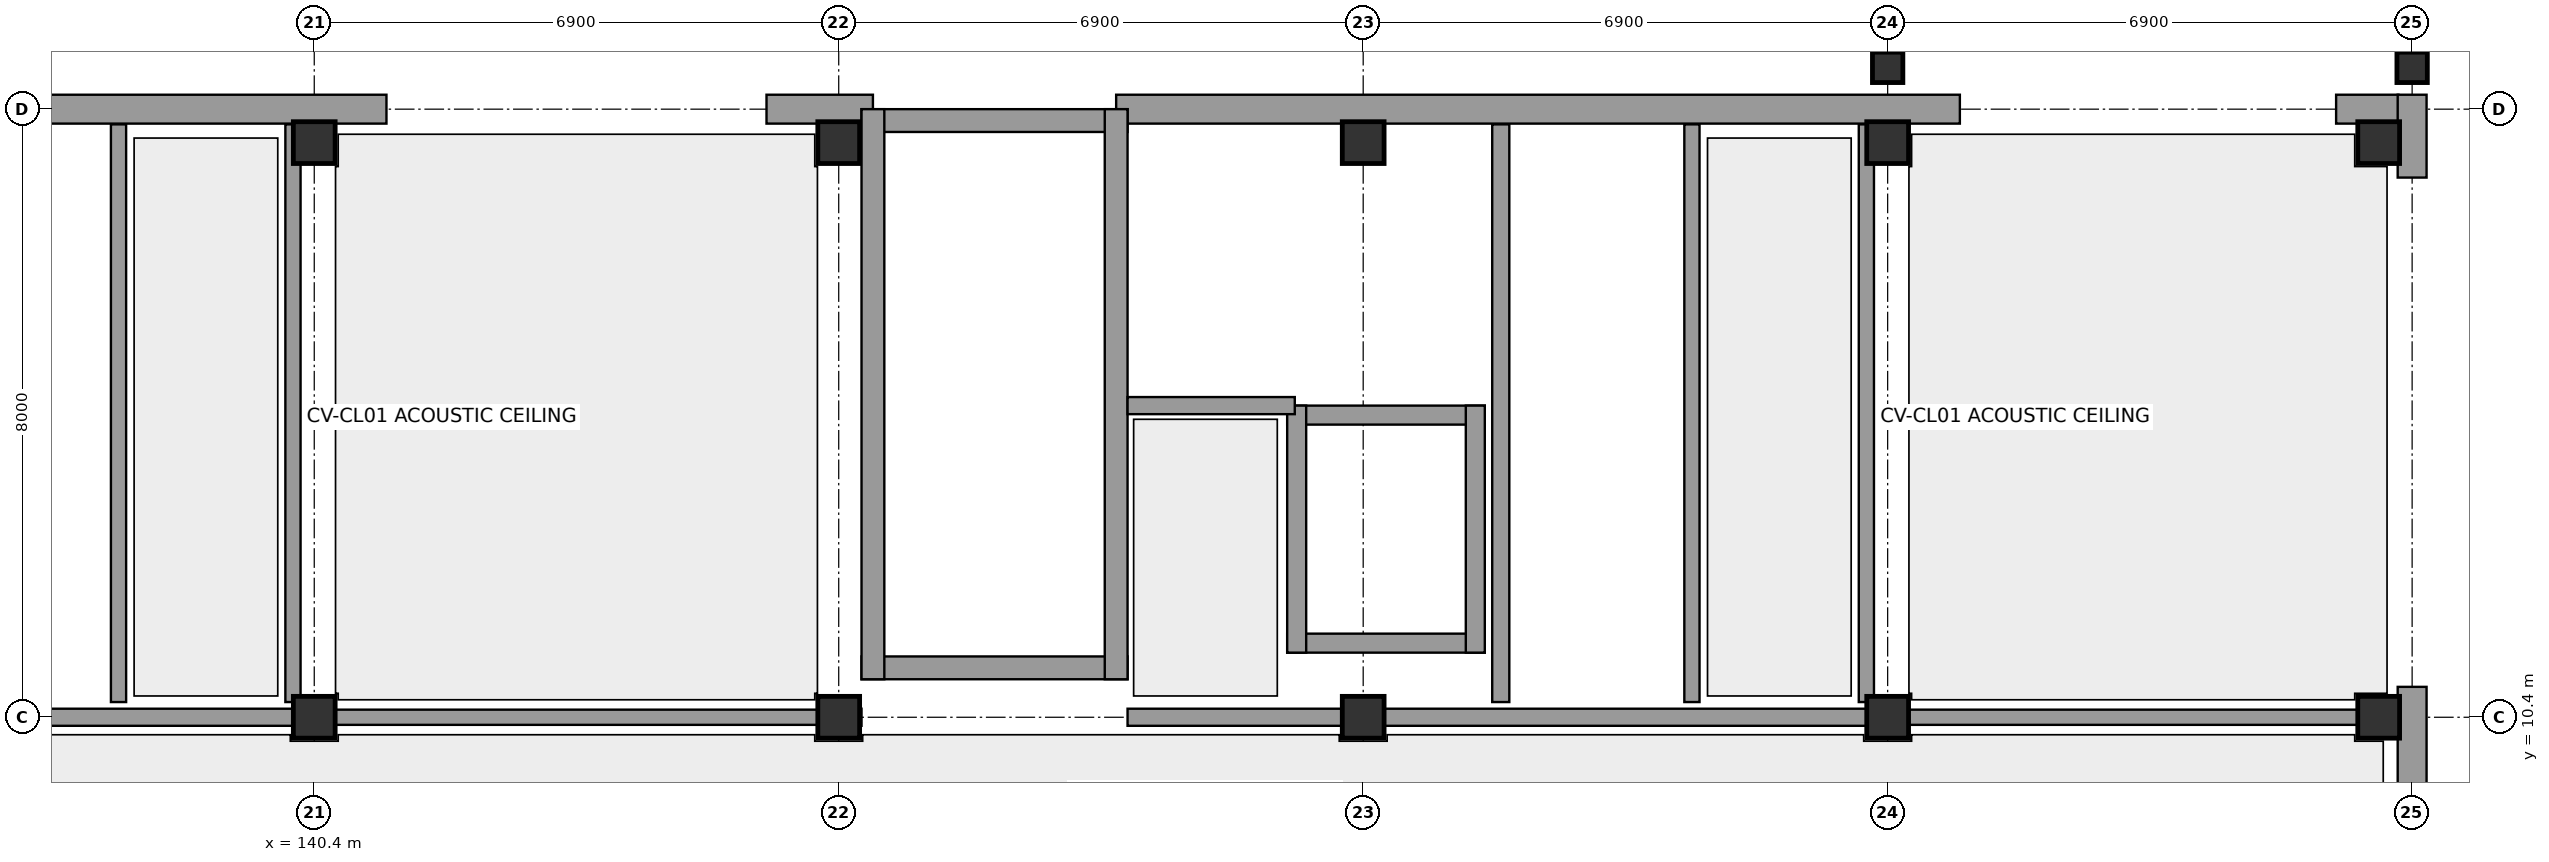
"""IFC4 building model, lengths in metres.
Left out: names, types, materials, properties, quantities, classifications, styles, units other than length and angle.
Written with IfcOpenShell. Run it as: python <this file> out.ifc"""

import sys

from ifc_helpers import new_model, si_unit, direction, frame, frame_2d, origin, origin_with_axes, origin_2d, place, context, subcontext, project, spatial, rectangle, extrude, element, fill, save


model = new_model("IFC4")
c1 = context("Model", 3, precision=1e-05, world=origin(), true_north=direction((0.0, 1.0)))
c2 = subcontext(c1, "Body", "Model", "MODEL_VIEW")
j1 = project(units=[si_unit("LENGTHUNIT", "METRE"), si_unit("PLANEANGLEUNIT", "RADIAN")], contexts=[c1])
p1 = place(None, origin())
s1 = spatial("IfcSite", under=j1, at=p1, CompositionType="ELEMENT")
p2 = place(p1, origin())
s2 = spatial("IfcBuilding", under=s1, at=p2, CompositionType="ELEMENT")
p3 = place(p2, origin())
s3 = spatial("IfcBuildingStorey", under=s2, at=p3, CompositionType="ELEMENT", Elevation=0.0)
for number, where, z_axis, x_axis in (
    (1, (140.4, 10.4, 0.0), (0.0, 0.0, 1.0), (1.0, 0.0, 0.0)),
    (2, (140.4, 17.96, 0.0), (0.0, 0.0, 1.0), (1.0, 0.0, 0.0)),
    (3, (147.3, 10.4, 0.0), (0.0, 0.0, 1.0), (1.0, 0.0, 0.0)),
    (4, (147.3, 17.96, 0.0), (0.0, 0.0, 1.0), (1.0, 0.0, 0.0)),
    (5, (154.2, 10.4, 0.0), (0.0, 0.0, 1.0), (1.0, 0.0, 0.0)),
    (6, (154.2, 17.96, 0.0), (0.0, 0.0, 1.0), (1.0, 0.0, 0.0)),
    (7, (161.1, 10.4, 0.0), (0.0, 0.0, 1.0), (1.0, 0.0, 0.0)),
    (8, (161.1, 17.96, 0.0), (0.0, 0.0, 1.0), (1.0, 0.0, 0.0)),
    (9, (167.56, 10.4, 0.0), (0.0, 0.0, 1.0), (1.0, 0.0, 0.0)),
    (10, (167.56, 17.96, 0.0), (0.0, 0.0, 1.0), (1.0, 0.0, 0.0)),
):
    element("IfcColumn", number, at=place(p3, frame(where, z_axis=z_axis, x_axis=x_axis)), inside=s3, PredefinedType="COLUMN", context=c2, shape_type="SweptSolid", body=[
        extrude(rectangle(XDim=0.55, YDim=0.55, at=origin_2d()), origin(), (0.0, 0.0, 1.0), 4.4),
    ])
for number, where, z_axis, x_axis in (
    (11, (161.1, 18.95, 0.0), (0.0, 0.0, 1.0), (1.0, 0.0, 0.0)),
    (12, (168.0, 18.95, 0.0), (0.0, 0.0, 1.0), (1.0, 0.0, 0.0)),
):
    element("IfcColumn", number, at=place(p3, frame(where, z_axis=z_axis, x_axis=x_axis)), inside=s3, PredefinedType="COLUMN", context=c2, shape_type="SweptSolid", body=[
        extrude(rectangle(XDim=0.4, YDim=0.4, at=origin_2d()), origin(), (0.0, 0.0, 1.0), 4.4),
    ])
p4 = place(p3, frame((130.25, 18.4, 0.0), z_axis=(0.0, 0.0, 1.0), x_axis=(1.0, 0.0, 0.0)))
e13 = element("IfcWall", 13, at=p4, inside=s3, PredefinedType="STANDARD", context=c2, shape_type="SweptSolid", body=[
    extrude(rectangle(XDim=11.1, YDim=0.38, at=frame_2d((5.55, 0.0))), origin(), (0.0, 0.0, 1.0), 4.12),
])
p5 = place(p3, frame((146.35, 18.4, 0.0), z_axis=(0.0, 0.0, 1.0), x_axis=(1.0, 0.0, 0.0)))
e14 = element("IfcWall", 14, at=p5, inside=s3, PredefinedType="STANDARD", context=c2, shape_type="SweptSolid", body=[
    extrude(rectangle(XDim=1.4, YDim=0.38, at=frame_2d((0.7, 0.0))), origin(), (0.0, 0.0, 1.0), 4.12),
])
p6 = place(p3, frame((150.95, 18.4, 0.0), z_axis=(0.0, 0.0, 1.0), x_axis=(1.0, 0.0, 0.0)))
e15 = element("IfcWall", 15, at=p6, inside=s3, PredefinedType="STANDARD", context=c2, shape_type="SweptSolid", body=[
    extrude(rectangle(XDim=11.1, YDim=0.38, at=frame_2d((5.55, 0.0))), origin(), (0.0, 0.0, 1.0), 4.12),
])
p7 = place(p3, frame((167.0, 18.4, 0.0), z_axis=(0.0, 0.0, 1.0), x_axis=(1.0, 0.0, 0.0)))
e16 = element("IfcWall", 16, at=p7, inside=s3, PredefinedType="STANDARD", context=c2, shape_type="SweptSolid", body=[
    extrude(rectangle(XDim=0.82, YDim=0.38, at=frame_2d((0.41, 0.0))), origin(), (0.0, 0.0, 1.0), 4.12),
])
p8 = place(p3, frame((168.0, 7.6, 0.0), z_axis=(0.0, 0.0, 1.0), x_axis=(0.0, 1.0, 0.0)))
e17 = element("IfcWall", 17, at=p8, inside=s3, PredefinedType="STANDARD", context=c2, shape_type="SweptSolid", body=[
    extrude(rectangle(XDim=3.2, YDim=0.38, at=frame_2d((1.6, 0.0))), origin(), (0.0, 0.0, 1.0), 4.12),
])
p9 = place(p3, frame((168.0, 17.5, 0.0), z_axis=(0.0, 0.0, 1.0), x_axis=(0.0, 1.0, 0.0)))
e18 = element("IfcWall", 18, at=p9, inside=s3, PredefinedType="STANDARD", context=c2, shape_type="SweptSolid", body=[
    extrude(rectangle(XDim=1.09, YDim=0.38, at=frame_2d((0.545, 0.0))), origin(), (0.0, 0.0, 1.0), 4.12),
])
p10 = place(p3, frame((168.0, 18.95, 0.0), z_axis=(0.0, 0.0, 1.0), x_axis=(0.0, 1.0, 0.0)))
e19 = element("IfcWall", 19, at=p10, inside=s3, PredefinedType="STANDARD", context=c2, shape_type="SweptSolid", body=[
    extrude(rectangle(XDim=6.85, YDim=0.31, at=frame_2d((3.425, 0.0))), origin(), (0.0, 0.0, 1.0), 3.68),
])
p11 = place(p10, frame((1.85, 0.0, 0.0)))
e20 = element("IfcOpeningElement", 20, at=p11, cuts=e19, PredefinedType="OPENING", context=c2, shape_type="SweptSolid", body=[
    extrude(rectangle(XDim=4.0, YDim=2.8, at=frame_2d((2.0, 1.4))), frame((0.0, 0.167, 0.0), z_axis=(0.0, -1.0, 0.0), x_axis=(1.0, 0.0, 0.0)), (0.0, 0.0, 1.0), 0.334),
])
for number, where, z_axis, x_axis in (
    (21, (137.825, 10.6, 0.0), (0.0, 0.0, 1.0), (0.0, 1.0, 0.0)),
    (22, (140.12, 10.6, 0.0), (0.0, 0.0, 1.0), (0.0, 1.0, 0.0)),
):
    element("IfcWall", number, at=place(p3, frame(where, z_axis=z_axis, x_axis=x_axis)), inside=s3, PredefinedType="PARTITIONING", context=c2, shape_type="SweptSolid", body=[
        extrude(rectangle(XDim=7.6, YDim=0.2, at=frame_2d((3.8, 0.0))), origin(), (0.0, 0.0, 1.0), 4.12),
    ])
p12 = place(p3, frame((130.4, 10.4, 0.0), z_axis=(0.0, 0.0, 1.0), x_axis=(1.0, 0.0, 0.0)))
e23 = element("IfcWall", 23, at=p12, inside=s3, PredefinedType="PARTITIONING", context=c2, shape_type="SweptSolid", body=[
    extrude(rectangle(XDim=10.0, YDim=0.225, at=frame_2d((5.0, 0.0))), origin(), (0.0, 0.0, 1.0), 3.56),
])
p13 = place(p12, frame((0.475, 0.0, 0.0)))
e24 = element("IfcOpeningElement", 24, at=p13, cuts=e23, PredefinedType="OPENING", context=c2, shape_type="SweptSolid", body=[
    extrude(rectangle(XDim=1.1, YDim=2.15, at=frame_2d((0.55, 1.075))), frame((0.0, 0.125, 0.0), z_axis=(0.0, -1.0, 0.0), x_axis=(1.0, 0.0, 0.0)), (0.0, 0.0, 1.0), 0.249),
])
p14 = place(p12, frame((5.85, 0.0, 0.0)))
e25 = element("IfcOpeningElement", 25, at=p14, cuts=e23, PredefinedType="OPENING", context=c2, shape_type="SweptSolid", body=[
    extrude(rectangle(XDim=0.9, YDim=2.1, at=frame_2d((0.45, 1.05))), frame((0.0, 0.125, 0.0), z_axis=(0.0, -1.0, 0.0), x_axis=(1.0, 0.0, 0.0)), (0.0, 0.0, 1.0), 0.249),
])
p15 = place(p12, frame((7.9, 0.0, 0.0)))
e26 = element("IfcOpeningElement", 26, at=p15, cuts=e23, PredefinedType="OPENING", context=c2, shape_type="SweptSolid", body=[
    extrude(rectangle(XDim=0.95, YDim=2.15, at=frame_2d((0.475, 1.075))), frame((0.0, 0.125, 0.0), z_axis=(0.0, -1.0, 0.0), x_axis=(1.0, 0.0, 0.0)), (0.0, 0.0, 1.0), 0.249),
])
p16 = place(p3, frame((147.6, 18.25, 0.0), z_axis=(0.0, 0.0, 1.0), x_axis=(1.0, 0.0, 0.0)))
e27 = element("IfcWall", 27, at=p16, inside=s3, PredefinedType="SHEAR", context=c2, shape_type="SweptSolid", body=[
    extrude(rectangle(XDim=3.5, YDim=0.3, at=frame_2d((1.75, 0.0))), origin(), (0.0, 0.0, 1.0), 4.12),
])
p17 = place(p16, frame((1.05, 0.0, 0.0)))
e28 = element("IfcOpeningElement", 28, at=p17, cuts=e27, PredefinedType="OPENING", context=c2, shape_type="SweptSolid", body=[
    extrude(rectangle(XDim=1.4, YDim=2.25, at=frame_2d((0.7, 1.125))), frame((0.0, 0.162, 0.0), z_axis=(0.0, -1.0, 0.0), x_axis=(1.0, 0.0, 0.0)), (0.0, 0.0, 1.0), 0.324),
])
p18 = place(p3, frame((147.6, 11.05, 0.0), z_axis=(0.0, 0.0, 1.0), x_axis=(1.0, 0.0, 0.0)))
e29 = element("IfcWall", 29, at=p18, inside=s3, PredefinedType="SHEAR", context=c2, shape_type="SweptSolid", body=[
    extrude(rectangle(XDim=3.5, YDim=0.3, at=frame_2d((1.75, 0.0))), origin(), (0.0, 0.0, 1.0), 4.12),
])
p19 = place(p3, frame((147.75, 10.9, 0.0), z_axis=(0.0, 0.0, 1.0), x_axis=(0.0, 1.0, 0.0)))
e30 = element("IfcWall", 30, at=p19, inside=s3, PredefinedType="SHEAR", context=c2, shape_type="SweptSolid", body=[
    extrude(rectangle(XDim=7.5, YDim=0.3, at=frame_2d((3.75, 0.0))), origin(), (0.0, 0.0, 1.0), 4.12),
])
p20 = place(p3, frame((150.95, 10.9, 0.0), z_axis=(0.0, 0.0, 1.0), x_axis=(0.0, 1.0, 0.0)))
e31 = element("IfcWall", 31, at=p20, inside=s3, PredefinedType="SHEAR", context=c2, shape_type="SweptSolid", body=[
    extrude(rectangle(XDim=7.5, YDim=0.3, at=frame_2d((3.75, 0.0))), origin(), (0.0, 0.0, 1.0), 4.12),
])
p21 = place(p20, frame((5.7, 0.0, 0.0)))
e32 = element("IfcOpeningElement", 32, at=p21, cuts=e31, PredefinedType="OPENING", context=c2, shape_type="SweptSolid", body=[
    extrude(rectangle(XDim=1.15, YDim=2.15, at=frame_2d((0.575, 1.075))), frame((0.0, 0.162, 0.0), z_axis=(0.0, -1.0, 0.0), x_axis=(1.0, 0.0, 0.0)), (0.0, 0.0, 1.0), 0.324),
])
p22 = place(p3, frame((153.2, 14.375, 0.0), z_axis=(0.0, 0.0, 1.0), x_axis=(1.0, 0.0, 0.0)))
e33 = element("IfcWall", 33, at=p22, inside=s3, PredefinedType="SHEAR", context=c2, shape_type="SweptSolid", body=[
    extrude(rectangle(XDim=2.6, YDim=0.25, at=frame_2d((1.3, 0.0))), origin(), (0.0, 0.0, 1.0), 4.12),
])
p23 = place(p22, frame((0.925, 0.0, 0.0)))
e34 = element("IfcOpeningElement", 34, at=p23, cuts=e33, PredefinedType="OPENING", context=c2, shape_type="SweptSolid", body=[
    extrude(rectangle(XDim=1.0, YDim=2.1, at=frame_2d((0.5, 1.05))), frame((0.0, 0.137, 0.0), z_axis=(0.0, -1.0, 0.0), x_axis=(1.0, 0.0, 0.0)), (0.0, 0.0, 1.0), 0.274),
])
p24 = place(p3, frame((153.2, 11.375, 0.0), z_axis=(0.0, 0.0, 1.0), x_axis=(1.0, 0.0, 0.0)))
e35 = element("IfcWall", 35, at=p24, inside=s3, PredefinedType="SHEAR", context=c2, shape_type="SweptSolid", body=[
    extrude(rectangle(XDim=2.6, YDim=0.25, at=frame_2d((1.3, 0.0))), origin(), (0.0, 0.0, 1.0), 4.12),
])
for number, where, z_axis, x_axis in (
    (36, (153.325, 11.25, 0.0), (0.0, 0.0, 1.0), (0.0, 1.0, 0.0)),
    (37, (155.675, 11.25, 0.0), (0.0, 0.0, 1.0), (0.0, 1.0, 0.0)),
):
    element("IfcWall", number, at=place(p3, frame(where, z_axis=z_axis, x_axis=x_axis)), inside=s3, PredefinedType="SHEAR", context=c2, shape_type="SweptSolid", body=[
        extrude(rectangle(XDim=3.25, YDim=0.25, at=frame_2d((1.625, 0.0))), origin(), (0.0, 0.0, 1.0), 4.12),
    ])
p25 = place(p3, frame((156.01, 10.6, 0.0), z_axis=(0.0, 0.0, 1.0), x_axis=(0.0, 1.0, 0.0)))
e38 = element("IfcWall", 38, at=p25, inside=s3, PredefinedType="PARTITIONING", context=c2, shape_type="SweptSolid", body=[
    extrude(rectangle(XDim=7.6, YDim=0.225, at=frame_2d((3.8, 0.0))), origin(), (0.0, 0.0, 1.0), 3.79),
])
p26 = place(p3, frame((151.1, 14.5, 0.0), z_axis=(0.0, 0.0, 1.0), x_axis=(1.0, 0.0, 0.0)))
e39 = element("IfcWall", 39, at=p26, inside=s3, PredefinedType="PARTITIONING", context=c2, shape_type="SweptSolid", body=[
    extrude(rectangle(XDim=2.2, YDim=0.225, at=frame_2d((1.1, 0.0))), origin(), (0.0, 0.0, 1.0), 4.12),
])
p27 = place(p26, frame((0.45, 0.0, 0.0)))
e40 = element("IfcOpeningElement", 40, at=p27, cuts=e39, PredefinedType="OPENING", context=c2, shape_type="SweptSolid", body=[
    extrude(rectangle(XDim=1.1, YDim=2.15, at=frame_2d((0.55, 1.075))), frame((0.0, 0.125, 0.0), z_axis=(0.0, -1.0, 0.0), x_axis=(1.0, 0.0, 0.0)), (0.0, 0.0, 1.0), 0.249),
])
p28 = place(p3, frame((147.3, 10.4, 0.0), z_axis=(0.0, 0.0, 1.0), x_axis=(1.0, 0.0, 0.0)))
e41 = element("IfcWall", 41, at=p28, inside=s3, PredefinedType="PARTITIONING", context=c2, shape_type="SweptSolid", body=[
    extrude(rectangle(XDim=0.3, YDim=0.225, at=frame_2d((0.15, 0.0))), origin(), (0.0, 0.0, 1.0), 4.12),
])
p29 = place(p3, frame((158.525, 10.6, 0.0), z_axis=(0.0, 0.0, 1.0), x_axis=(0.0, 1.0, 0.0)))
e42 = element("IfcWall", 42, at=p29, inside=s3, PredefinedType="PARTITIONING", context=c2, shape_type="SweptSolid", body=[
    extrude(rectangle(XDim=7.6, YDim=0.2, at=frame_2d((3.8, 0.0))), origin(), (0.0, 0.0, 1.0), 3.79),
])
p30 = place(p3, frame((160.82, 10.6, 0.0), z_axis=(0.0, 0.0, 1.0), x_axis=(0.0, 1.0, 0.0)))
e43 = element("IfcWall", 43, at=p30, inside=s3, PredefinedType="PARTITIONING", context=c2, shape_type="SweptSolid", body=[
    extrude(rectangle(XDim=7.6, YDim=0.2, at=frame_2d((3.8, 0.0))), origin(), (0.0, 0.0, 1.0), 3.56),
])
p31 = place(p3, frame((151.1, 10.4, 0.0), z_axis=(0.0, 0.0, 1.0), x_axis=(1.0, 0.0, 0.0)))
e44 = element("IfcWall", 44, at=p31, inside=s3, PredefinedType="PARTITIONING", context=c2, shape_type="SweptSolid", body=[
    extrude(rectangle(XDim=10.0, YDim=0.225, at=frame_2d((5.0, 0.0))), origin(), (0.0, 0.0, 1.0), 3.56),
])
p32 = place(p31, frame((0.475, 0.0, 0.0)))
e45 = element("IfcOpeningElement", 45, at=p32, cuts=e44, PredefinedType="OPENING", context=c2, shape_type="SweptSolid", body=[
    extrude(rectangle(XDim=1.1, YDim=2.15, at=frame_2d((0.55, 1.075))), frame((0.0, 0.125, 0.0), z_axis=(0.0, -1.0, 0.0), x_axis=(1.0, 0.0, 0.0)), (0.0, 0.0, 1.0), 0.249),
])
p33 = place(p31, frame((5.85, 0.0, 0.0)))
e46 = element("IfcOpeningElement", 46, at=p33, cuts=e44, PredefinedType="OPENING", context=c2, shape_type="SweptSolid", body=[
    extrude(rectangle(XDim=0.9, YDim=2.1, at=frame_2d((0.45, 1.05))), frame((0.0, 0.125, 0.0), z_axis=(0.0, -1.0, 0.0), x_axis=(1.0, 0.0, 0.0)), (0.0, 0.0, 1.0), 0.249),
])
p34 = place(p31, frame((7.9, 0.0, 0.0)))
e47 = element("IfcOpeningElement", 47, at=p34, cuts=e44, PredefinedType="OPENING", context=c2, shape_type="SweptSolid", body=[
    extrude(rectangle(XDim=0.95, YDim=2.15, at=frame_2d((0.475, 1.075))), frame((0.0, 0.125, 0.0), z_axis=(0.0, -1.0, 0.0), x_axis=(1.0, 0.0, 0.0)), (0.0, 0.0, 1.0), 0.249),
])
p35 = place(p3, frame((140.6, 10.4, 0.0), z_axis=(0.0, 0.0, 1.0), x_axis=(1.0, 0.0, 0.0)))
e48 = element("IfcWall", 48, at=p35, inside=s3, PredefinedType="PARTITIONING", context=c2, shape_type="SweptSolid", body=[
    extrude(rectangle(XDim=6.5, YDim=0.2, at=frame_2d((3.25, 0.0))), origin(), (0.0, 0.0, 1.0), 3.56),
])
p36 = place(p35, frame((1.9, 0.0, 0.0)))
e49 = element("IfcOpeningElement", 49, at=p36, cuts=e48, PredefinedType="OPENING", context=c2, shape_type="SweptSolid", body=[
    extrude(rectangle(XDim=0.95, YDim=2.15, at=frame_2d((0.475, 1.075))), frame((0.0, 0.112, 0.0), z_axis=(0.0, -1.0, 0.0), x_axis=(1.0, 0.0, 0.0)), (0.0, 0.0, 1.0), 0.224),
])
p37 = place(p3, frame((161.3, 10.4, 0.0), z_axis=(0.0, 0.0, 1.0), x_axis=(1.0, 0.0, 0.0)))
e50 = element("IfcWall", 50, at=p37, inside=s3, PredefinedType="PARTITIONING", context=c2, shape_type="SweptSolid", body=[
    extrude(rectangle(XDim=6.45, YDim=0.2, at=frame_2d((3.225, 0.0))), origin(), (0.0, 0.0, 1.0), 3.56),
])
p38 = place(p37, frame((1.9, 0.0, 0.0)))
e51 = element("IfcOpeningElement", 51, at=p38, cuts=e50, PredefinedType="OPENING", context=c2, shape_type="SweptSolid", body=[
    extrude(rectangle(XDim=0.95, YDim=2.15, at=frame_2d((0.475, 1.075))), frame((0.0, 0.112, 0.0), z_axis=(0.0, -1.0, 0.0), x_axis=(1.0, 0.0, 0.0)), (0.0, 0.0, 1.0), 0.224),
])
p39 = place(p14, frame((0.9, 0.0, 0.0), z_axis=(0.0, 0.0, 1.0), x_axis=(-1.0, 0.0, 0.0)))
e52 = element("IfcDoor", 52, at=p39, inside=s3, OperationType="SINGLE_SWING_LEFT", PredefinedType="DOOR", context=c2, shape_type="SweptSolid", body=[
    extrude(rectangle(XDim=0.9, YDim=2.1, at=frame_2d((0.45, 1.05))), frame((0.0, 0.025, 0.0), z_axis=(0.0, -1.0, 0.0), x_axis=(1.0, 0.0, 0.0)), (0.0, 0.0, 1.0), 0.05),
])
fill(e25, e52)
p40 = place(p15, frame((0.95, 0.0, 0.0), z_axis=(0.0, 0.0, 1.0), x_axis=(-1.0, 0.0, 0.0)))
e53 = element("IfcDoor", 53, at=p40, inside=s3, OperationType="SINGLE_SWING_RIGHT", PredefinedType="DOOR", context=c2, shape_type="SweptSolid", body=[
    extrude(rectangle(XDim=0.95, YDim=2.15, at=frame_2d((0.475, 1.075))), frame((0.0, 0.025, 0.0), z_axis=(0.0, -1.0, 0.0), x_axis=(1.0, 0.0, 0.0)), (0.0, 0.0, 1.0), 0.05),
])
fill(e26, e53)
p41 = place(p17, origin_with_axes())
e54 = element("IfcDoor", 54, at=p41, inside=s3, OperationType="DOUBLE_DOOR_SINGLE_SWING", PredefinedType="DOOR", context=c2, shape_type="SweptSolid", body=[
    extrude(rectangle(XDim=1.4, YDim=2.25, at=frame_2d((0.7, 1.125))), frame((0.0, 0.025, 0.0), z_axis=(0.0, -1.0, 0.0), x_axis=(1.0, 0.0, 0.0)), (0.0, 0.0, 1.0), 0.05),
])
fill(e28, e54)
p42 = place(p21, origin_with_axes())
e55 = element("IfcDoor", 55, at=p42, inside=s3, OperationType="SINGLE_SWING_LEFT", PredefinedType="DOOR", context=c2, shape_type="SweptSolid", body=[
    extrude(rectangle(XDim=1.15, YDim=2.15, at=frame_2d((0.575, 1.075))), frame((0.0, 0.025, 0.0), z_axis=(0.0, -1.0, 0.0), x_axis=(1.0, 0.0, 0.0)), (0.0, 0.0, 1.0), 0.05),
])
fill(e32, e55)
p43 = place(p23, origin_with_axes())
e56 = element("IfcDoor", 56, at=p43, inside=s3, OperationType="SLIDING_TO_LEFT", PredefinedType="DOOR", context=c2, shape_type="SweptSolid", body=[
    extrude(rectangle(XDim=1.0, YDim=2.1, at=frame_2d((0.5, 1.05))), frame((0.0, 0.025, 0.0), z_axis=(0.0, -1.0, 0.0), x_axis=(1.0, 0.0, 0.0)), (0.0, 0.0, 1.0), 0.05),
])
fill(e34, e56)
p44 = place(p27, origin_with_axes())
e57 = element("IfcDoor", 57, at=p44, inside=s3, OperationType="SINGLE_SWING_LEFT", PredefinedType="DOOR", context=c2, shape_type="SweptSolid", body=[
    extrude(rectangle(XDim=1.1, YDim=2.15, at=frame_2d((0.55, 1.075))), frame((0.0, 0.025, 0.0), z_axis=(0.0, -1.0, 0.0), x_axis=(1.0, 0.0, 0.0)), (0.0, 0.0, 1.0), 0.05),
])
fill(e40, e57)
p45 = place(p32, origin_with_axes())
e58 = element("IfcDoor", 58, at=p45, inside=s3, OperationType="SINGLE_SWING_RIGHT", PredefinedType="DOOR", context=c2, shape_type="SweptSolid", body=[
    extrude(rectangle(XDim=1.1, YDim=2.15, at=frame_2d((0.55, 1.075))), frame((0.0, 0.025, 0.0), z_axis=(0.0, -1.0, 0.0), x_axis=(1.0, 0.0, 0.0)), (0.0, 0.0, 1.0), 0.05),
])
fill(e45, e58)
p46 = place(p33, frame((0.9, 0.0, 0.0), z_axis=(0.0, 0.0, 1.0), x_axis=(-1.0, 0.0, 0.0)))
e59 = element("IfcDoor", 59, at=p46, inside=s3, OperationType="SINGLE_SWING_LEFT", PredefinedType="DOOR", context=c2, shape_type="SweptSolid", body=[
    extrude(rectangle(XDim=0.9, YDim=2.1, at=frame_2d((0.45, 1.05))), frame((0.0, 0.025, 0.0), z_axis=(0.0, -1.0, 0.0), x_axis=(1.0, 0.0, 0.0)), (0.0, 0.0, 1.0), 0.05),
])
fill(e46, e59)
p47 = place(p34, frame((0.95, 0.0, 0.0), z_axis=(0.0, 0.0, 1.0), x_axis=(-1.0, 0.0, 0.0)))
e60 = element("IfcDoor", 60, at=p47, inside=s3, OperationType="SINGLE_SWING_RIGHT", PredefinedType="DOOR", context=c2, shape_type="SweptSolid", body=[
    extrude(rectangle(XDim=0.95, YDim=2.15, at=frame_2d((0.475, 1.075))), frame((0.0, 0.025, 0.0), z_axis=(0.0, -1.0, 0.0), x_axis=(1.0, 0.0, 0.0)), (0.0, 0.0, 1.0), 0.05),
])
fill(e47, e60)
p48 = place(p36, frame((0.95, 0.0, 0.0), z_axis=(0.0, 0.0, 1.0), x_axis=(-1.0, 0.0, 0.0)))
e61 = element("IfcDoor", 61, at=p48, inside=s3, OperationType="SINGLE_SWING_LEFT", PredefinedType="DOOR", context=c2, shape_type="SweptSolid", body=[
    extrude(rectangle(XDim=0.95, YDim=2.15, at=frame_2d((0.475, 1.075))), frame((0.0, 0.025, 0.0), z_axis=(0.0, -1.0, 0.0), x_axis=(1.0, 0.0, 0.0)), (0.0, 0.0, 1.0), 0.05),
])
fill(e49, e61)
p49 = place(p38, origin_with_axes())
e62 = element("IfcDoor", 62, at=p49, inside=s3, OperationType="SINGLE_SWING_LEFT", PredefinedType="DOOR", context=c2, shape_type="SweptSolid", body=[
    extrude(rectangle(XDim=0.95, YDim=2.15, at=frame_2d((0.475, 1.075))), frame((0.0, 0.025, 0.0), z_axis=(0.0, -1.0, 0.0), x_axis=(1.0, 0.0, 0.0)), (0.0, 0.0, 1.0), 0.05),
])
fill(e51, e62)
save(model, sys.argv[1])
